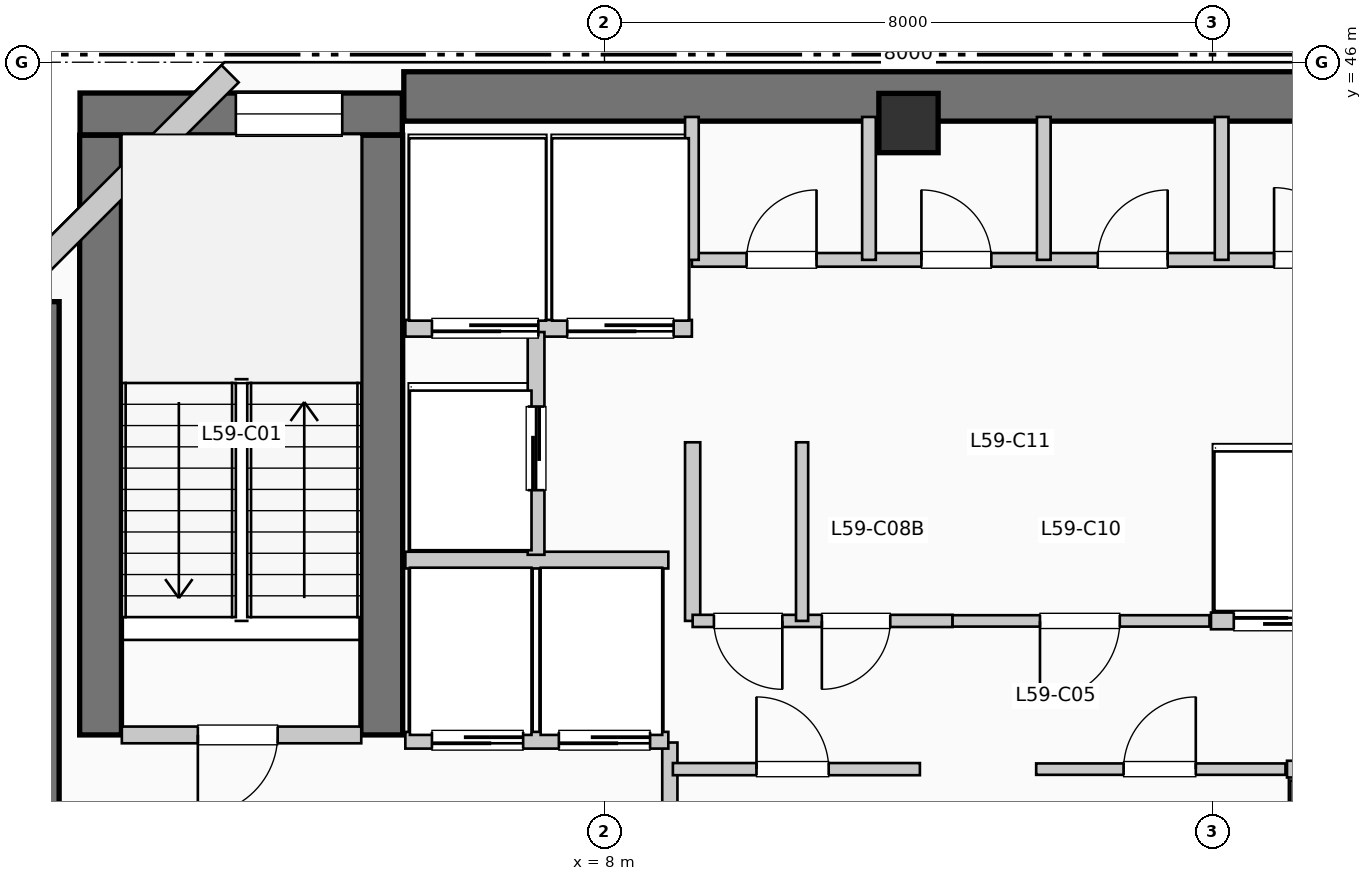
"""IFC4 building model, lengths in metres.
Left out: names, types, materials, properties, quantities, classifications, styles, units other than length and angle.
Written with IfcOpenShell. Run it as: python <this file> out.ifc"""

import sys

from ifc_helpers import new_model, si_unit, direction, frame, frame_2d, origin, origin_2d, place, context, subcontext, project, spatial, rectangle, extrude, element, fill, save


model = new_model("IFC4")
c1 = context("Model", 3, precision=1e-05, world=origin(), true_north=direction((0.0, 1.0)))
c2 = subcontext(c1, "Body", "Model", "MODEL_VIEW")
j1 = project(units=[si_unit("LENGTHUNIT", "METRE"), si_unit("PLANEANGLEUNIT", "RADIAN")], contexts=[c1])
p1 = place(None, origin())
s1 = spatial("IfcSite", under=j1, at=p1, CompositionType="ELEMENT")
p2 = place(p1, origin())
s2 = spatial("IfcBuilding", under=s1, at=p2, CompositionType="ELEMENT")
p3 = place(p2, frame((0.0, 0.0, 243.54)))
s3 = spatial("IfcBuildingStorey", under=s2, at=p3, CompositionType="ELEMENT", Elevation=243.54)
p4 = place(p3, frame((5.36, 45.55, 0.0), z_axis=(0.0, 0.0, 1.0), x_axis=(1.0, 0.0, 0.0)))
e1 = element("IfcWall", 1, at=p4, inside=s3, PredefinedType="SHEAR", context=c2, shape_type="SweptSolid", body=[
    extrude(rectangle(XDim=13.98, YDim=0.65, at=frame_2d((6.99, 0.0))), origin(), (0.0, 0.0, 1.0), 3.96),
])
p5 = place(p3, frame((0.5, 34.95, 0.0), z_axis=(0.0, 0.0, 1.0), x_axis=(0.0, 1.0, 0.0)))
e2 = element("IfcWall", 2, at=p5, inside=s3, PredefinedType="SHEAR", context=c2, shape_type="SweptSolid", body=[
    extrude(rectangle(XDim=7.9, YDim=0.65, at=frame_2d((3.95, 0.0))), origin(), (0.0, 0.0, 1.0), 3.96),
])
for number, where, z_axis, x_axis in (
    (3, (1.37, 37.15, 0.0), (0.0, 0.0, 1.0), (0.0, 1.0, 0.0)),
    (4, (5.07, 37.15, 0.0), (0.0, 0.0, 1.0), (0.0, 1.0, 0.0)),
):
    element("IfcWall", number, at=place(p3, frame(where, z_axis=z_axis, x_axis=x_axis)), inside=s3, PredefinedType="SHEAR", context=c2, shape_type="SweptSolid", body=[
        extrude(rectangle(XDim=7.89, YDim=0.55, at=frame_2d((3.945, 0.0))), origin(), (0.0, 0.0, 1.0), 3.96),
    ])
p6 = place(p3, frame((1.1, 45.32, 0.0), z_axis=(0.0, 0.0, 1.0), x_axis=(1.0, 0.0, 0.0)))
e5 = element("IfcWall", 5, at=p6, inside=s3, PredefinedType="SHEAR", context=c2, shape_type="SweptSolid", body=[
    extrude(rectangle(XDim=4.24, YDim=0.55, at=frame_2d((2.12, 0.0))), origin(), (0.0, 0.0, 1.0), 3.96),
])
p7 = place(p6, frame((2.05, 0.0, 1.05)))
e6 = element("IfcOpeningElement", 6, at=p7, cuts=e5, PredefinedType="OPENING", context=c2, shape_type="SweptSolid", body=[
    extrude(rectangle(XDim=1.4, YDim=1.8, at=frame_2d((0.7, 0.9))), frame((0.0, 0.285, 0.0), z_axis=(0.0, -1.0, 0.0), x_axis=(1.0, 0.0, 0.0)), (0.0, 0.0, 1.0), 0.57),
])
p8 = place(p3, frame((12.0, 45.2, 0.0), z_axis=(0.0, 0.0, 1.0), x_axis=(1.0, 0.0, 0.0)))
e7 = element("IfcColumn", 7, at=p8, inside=s3, PredefinedType="COLUMN", context=c2, shape_type="SweptSolid", body=[
    extrude(rectangle(XDim=0.78, YDim=0.78, at=origin_2d()), origin(), (0.0, 0.0, 1.0), 3.96),
])
p9 = place(p3, frame((3.074, 45.848, 0.0), z_axis=(0.0, 0.0, 1.0), x_axis=(-0.707106781187, -0.707106781187, 0.0)))
e8 = element("IfcWall", 8, at=p9, inside=s3, PredefinedType="SOLIDWALL", context=c2, shape_type="SweptSolid", body=[
    extrude(rectangle(XDim=4.133, YDim=0.32, at=frame_2d((2.066, 0.0))), origin(), (0.0, 0.0, 1.0), 3.71),
])
p10 = place(p3, frame((1.65, 37.15, 0.0), z_axis=(0.0, 0.0, 1.0), x_axis=(1.0, 0.0, 0.0)))
e9 = element("IfcWall", 9, at=p10, inside=s3, PredefinedType="PARTITIONING", context=c2, shape_type="SweptSolid", body=[
    extrude(rectangle(XDim=3.15, YDim=0.22, at=frame_2d((1.575, 0.0))), origin(), (0.0, 0.0, 1.0), 3.71),
])
p11 = place(p10, frame((2.05, 0.0, 0.0), z_axis=(0.0, 0.0, 1.0), x_axis=(-1.0, 0.0, 0.0)))
e10 = element("IfcOpeningElement", 10, at=p11, cuts=e9, PredefinedType="OPENING", context=c2, shape_type="SweptSolid", body=[
    extrude(rectangle(XDim=1.05, YDim=2.15, at=frame_2d((0.525, 1.075))), frame((0.0, 0.12, 0.0), z_axis=(0.0, -1.0, 0.0), x_axis=(1.0, 0.0, 0.0)), (0.0, 0.0, 1.0), 0.24),
])
p12 = place(p3, frame((8.86, 34.55, 0.0), z_axis=(0.0, 0.0, 1.0), x_axis=(0.0, 1.0, 0.0)))
e11 = element("IfcWall", 11, at=p12, inside=s3, PredefinedType="PARTITIONING", context=c2, shape_type="SweptSolid", body=[
    extrude(rectangle(XDim=2.5, YDim=0.2, at=frame_2d((1.25, 0.0))), origin(), (0.0, 0.0, 1.0), 3.71),
])
p13 = place(p3, frame((5.38, 37.08, 0.0), z_axis=(0.0, 0.0, 1.0), x_axis=(1.0, 0.0, 0.0)))
e12 = element("IfcWall", 12, at=p13, inside=s3, PredefinedType="PARTITIONING", context=c2, shape_type="SweptSolid", body=[
    extrude(rectangle(XDim=3.46, YDim=0.22, at=frame_2d((1.73, 0.0))), origin(), (0.0, 0.0, 1.0), 3.71),
])
p14 = place(p13, frame((1.55, 0.0, 0.0), z_axis=(0.0, 0.0, 1.0), x_axis=(-1.0, 0.0, 0.0)))
e13 = element("IfcOpeningElement", 13, at=p14, cuts=e12, PredefinedType="OPENING", context=c2, shape_type="SweptSolid", body=[
    extrude(rectangle(XDim=1.2, YDim=2.2, at=frame_2d((0.6, 1.1))), frame((0.0, 0.12, 0.0), z_axis=(0.0, -1.0, 0.0), x_axis=(1.0, 0.0, 0.0)), (0.0, 0.0, 1.0), 0.24),
])
p15 = place(p13, frame((3.22, 0.0, 0.0), z_axis=(0.0, 0.0, 1.0), x_axis=(-1.0, 0.0, 0.0)))
e14 = element("IfcOpeningElement", 14, at=p15, cuts=e12, PredefinedType="OPENING", context=c2, shape_type="SweptSolid", body=[
    extrude(rectangle(XDim=1.2, YDim=2.2, at=frame_2d((0.6, 1.1))), frame((0.0, 0.12, 0.0), z_axis=(0.0, -1.0, 0.0), x_axis=(1.0, 0.0, 0.0)), (0.0, 0.0, 1.0), 0.24),
])
p16 = place(p3, frame((5.38, 39.45, 0.0), z_axis=(0.0, 0.0, 1.0), x_axis=(1.0, 0.0, 0.0)))
e15 = element("IfcWall", 15, at=p16, inside=s3, PredefinedType="PARTITIONING", context=c2, shape_type="SweptSolid", body=[
    extrude(rectangle(XDim=3.46, YDim=0.22, at=frame_2d((1.73, 0.0))), origin(), (0.0, 0.0, 1.0), 3.71),
])
p17 = place(p3, frame((5.38, 42.5, 0.0), z_axis=(0.0, 0.0, 1.0), x_axis=(1.0, 0.0, 0.0)))
e16 = element("IfcWall", 16, at=p17, inside=s3, PredefinedType="PARTITIONING", context=c2, shape_type="SweptSolid", body=[
    extrude(rectangle(XDim=3.77, YDim=0.22, at=frame_2d((1.885, 0.0))), origin(), (0.0, 0.0, 1.0), 3.71),
])
p18 = place(p17, frame((1.75, 0.0, 0.0), z_axis=(0.0, 0.0, 1.0), x_axis=(-1.0, 0.0, 0.0)))
e17 = element("IfcOpeningElement", 17, at=p18, cuts=e16, PredefinedType="OPENING", context=c2, shape_type="SweptSolid", body=[
    extrude(rectangle(XDim=1.4, YDim=2.2, at=frame_2d((0.7, 1.1))), frame((0.0, 0.12, 0.0), z_axis=(0.0, -1.0, 0.0), x_axis=(1.0, 0.0, 0.0)), (0.0, 0.0, 1.0), 0.24),
])
p19 = place(p17, frame((3.53, 0.0, 0.0), z_axis=(0.0, 0.0, 1.0), x_axis=(-1.0, 0.0, 0.0)))
e18 = element("IfcOpeningElement", 18, at=p19, cuts=e16, PredefinedType="OPENING", context=c2, shape_type="SweptSolid", body=[
    extrude(rectangle(XDim=1.4, YDim=2.2, at=frame_2d((0.7, 1.1))), frame((0.0, 0.12, 0.0), z_axis=(0.0, -1.0, 0.0), x_axis=(1.0, 0.0, 0.0)), (0.0, 0.0, 1.0), 0.24),
])
p20 = place(p3, frame((7.1, 39.52, 0.0), z_axis=(0.0, 0.0, 1.0), x_axis=(0.0, 1.0, 0.0)))
e19 = element("IfcWall", 19, at=p20, inside=s3, PredefinedType="PARTITIONING", context=c2, shape_type="SweptSolid", body=[
    extrude(rectangle(XDim=2.93, YDim=0.22, at=frame_2d((1.465, 0.0))), origin(), (0.0, 0.0, 1.0), 3.71),
])
p21 = place(p20, frame((0.85, 0.0, 0.0)))
e20 = element("IfcOpeningElement", 20, at=p21, cuts=e19, PredefinedType="OPENING", context=c2, shape_type="SweptSolid", body=[
    extrude(rectangle(XDim=1.1, YDim=2.2, at=frame_2d((0.55, 1.1))), frame((0.0, 0.12, 0.0), z_axis=(0.0, -1.0, 0.0), x_axis=(1.0, 0.0, 0.0)), (0.0, 0.0, 1.0), 0.24),
])
p22 = place(p3, frame((9.16, 38.65, 0.0), z_axis=(0.0, 0.0, 1.0), x_axis=(0.0, 1.0, 0.0)))
e21 = element("IfcWall", 21, at=p22, inside=s3, PredefinedType="PARTITIONING", context=c2, shape_type="SweptSolid", body=[
    extrude(rectangle(XDim=2.35, YDim=0.2, at=frame_2d((1.175, 0.0))), origin(), (0.0, 0.0, 1.0), 3.71),
])
p23 = place(p3, frame((8.9, 36.7, 0.0), z_axis=(0.0, 0.0, 1.0), x_axis=(1.0, 0.0, 0.0)))
e22 = element("IfcWall", 22, at=p23, inside=s3, PredefinedType="PARTITIONING", context=c2, shape_type="SweptSolid", body=[
    extrude(rectangle(XDim=3.25, YDim=0.16, at=frame_2d((1.625, 0.0))), origin(), (0.0, 0.0, 1.0), 3.71),
])
p24 = place(p23, frame((1.1, 0.0, 0.0)))
e23 = element("IfcOpeningElement", 23, at=p24, cuts=e22, PredefinedType="OPENING", context=c2, shape_type="SweptSolid", body=[
    extrude(rectangle(XDim=0.95, YDim=2.15, at=frame_2d((0.475, 1.075))), frame((0.0, 0.09, 0.0), z_axis=(0.0, -1.0, 0.0), x_axis=(1.0, 0.0, 0.0)), (0.0, 0.0, 1.0), 0.18),
])
p25 = place(p3, frame((9.16, 38.65, 0.0), z_axis=(0.0, 0.0, 1.0), x_axis=(1.0, 0.0, 0.0)))
e24 = element("IfcWall", 24, at=p25, inside=s3, PredefinedType="PARTITIONING", context=c2, shape_type="SweptSolid", body=[
    extrude(rectangle(XDim=3.42, YDim=0.16, at=frame_2d((1.71, 0.0))), origin(), (0.0, 0.0, 1.0), 3.71),
])
p26 = place(p25, frame((1.18, 0.0, 0.0), z_axis=(0.0, 0.0, 1.0), x_axis=(-1.0, 0.0, 0.0)))
e25 = element("IfcOpeningElement", 25, at=p26, cuts=e24, PredefinedType="OPENING", context=c2, shape_type="SweptSolid", body=[
    extrude(rectangle(XDim=0.9, YDim=2.15, at=frame_2d((0.45, 1.075))), frame((0.0, 0.09, 0.0), z_axis=(0.0, -1.0, 0.0), x_axis=(1.0, 0.0, 0.0)), (0.0, 0.0, 1.0), 0.18),
])
p27 = place(p25, frame((2.6, 0.0, 0.0), z_axis=(0.0, 0.0, 1.0), x_axis=(-1.0, 0.0, 0.0)))
e26 = element("IfcOpeningElement", 26, at=p27, cuts=e24, PredefinedType="OPENING", context=c2, shape_type="SweptSolid", body=[
    extrude(rectangle(XDim=0.9, YDim=2.15, at=frame_2d((0.45, 1.075))), frame((0.0, 0.09, 0.0), z_axis=(0.0, -1.0, 0.0), x_axis=(1.0, 0.0, 0.0)), (0.0, 0.0, 1.0), 0.18),
])
p28 = place(p3, frame((10.6, 38.65, 0.0), z_axis=(0.0, 0.0, 1.0), x_axis=(0.0, 1.0, 0.0)))
e27 = element("IfcWall", 27, at=p28, inside=s3, PredefinedType="PARTITIONING", context=c2, shape_type="SweptSolid", body=[
    extrude(rectangle(XDim=2.35, YDim=0.16, at=frame_2d((1.175, 0.0))), origin(), (0.0, 0.0, 1.0), 3.71),
])
p29 = place(p3, frame((13.68, 36.7, 0.0), z_axis=(0.0, 0.0, 1.0), x_axis=(1.0, 0.0, 0.0)))
e28 = element("IfcWall", 28, at=p29, inside=s3, PredefinedType="PARTITIONING", context=c2, shape_type="SweptSolid", body=[
    extrude(rectangle(XDim=3.28, YDim=0.15, at=frame_2d((1.64, 0.0))), origin(), (0.0, 0.0, 1.0), 3.71),
])
p30 = place(p29, frame((1.15, 0.0, 0.0)))
e29 = element("IfcOpeningElement", 29, at=p30, cuts=e28, PredefinedType="OPENING", context=c2, shape_type="SweptSolid", body=[
    extrude(rectangle(XDim=0.95, YDim=2.15, at=frame_2d((0.475, 1.075))), frame((0.0, 0.085, 0.0), z_axis=(0.0, -1.0, 0.0), x_axis=(1.0, 0.0, 0.0)), (0.0, 0.0, 1.0), 0.17),
])
p31 = place(p3, frame((12.58, 38.65, 0.0), z_axis=(0.0, 0.0, 1.0), x_axis=(1.0, 0.0, 0.0)))
e30 = element("IfcWall", 30, at=p31, inside=s3, PredefinedType="PARTITIONING", context=c2, shape_type="SweptSolid", body=[
    extrude(rectangle(XDim=3.38, YDim=0.15, at=frame_2d((1.69, 0.0))), origin(), (0.0, 0.0, 1.0), 3.71),
])
p32 = place(p31, frame((2.2, 0.0, 0.0), z_axis=(0.0, 0.0, 1.0), x_axis=(-1.0, 0.0, 0.0)))
e31 = element("IfcOpeningElement", 31, at=p32, cuts=e30, PredefinedType="OPENING", context=c2, shape_type="SweptSolid", body=[
    extrude(rectangle(XDim=1.05, YDim=2.15, at=frame_2d((0.525, 1.075))), frame((0.0, 0.085, 0.0), z_axis=(0.0, -1.0, 0.0), x_axis=(1.0, 0.0, 0.0)), (0.0, 0.0, 1.0), 0.17),
])
p33 = place(p3, frame((16.98, 36.7, 0.0), z_axis=(0.0, 0.0, 1.0), x_axis=(1.0, 0.0, 0.0)))
e32 = element("IfcWall", 32, at=p33, inside=s3, PredefinedType="PARTITIONING", context=c2, shape_type="SweptSolid", body=[
    extrude(rectangle(XDim=1.7, YDim=0.22, at=frame_2d((0.85, 0.0))), origin(), (0.0, 0.0, 1.0), 3.71),
])
p34 = place(p33, frame((0.3, 0.0, 0.0)))
e33 = element("IfcOpeningElement", 33, at=p34, cuts=e32, PredefinedType="OPENING", context=c2, shape_type="SweptSolid", body=[
    extrude(rectangle(XDim=1.1, YDim=2.2, at=frame_2d((0.55, 1.1))), frame((0.0, 0.12, 0.0), z_axis=(0.0, -1.0, 0.0), x_axis=(1.0, 0.0, 0.0)), (0.0, 0.0, 1.0), 0.24),
])
p35 = place(p3, frame((15.98, 38.65, 0.0), z_axis=(0.0, 0.0, 1.0), x_axis=(1.0, 0.0, 0.0)))
e34 = element("IfcWall", 34, at=p35, inside=s3, PredefinedType="PARTITIONING", context=c2, shape_type="SweptSolid", body=[
    extrude(rectangle(XDim=1.72, YDim=0.22, at=frame_2d((0.86, 0.0))), origin(), (0.0, 0.0, 1.0), 3.71),
])
p36 = place(p35, frame((0.3, 0.0, 0.0)))
e35 = element("IfcOpeningElement", 35, at=p36, cuts=e34, PredefinedType="OPENING", context=c2, shape_type="SweptSolid", body=[
    extrude(rectangle(XDim=1.1, YDim=2.2, at=frame_2d((0.55, 1.1))), frame((0.0, 0.12, 0.0), z_axis=(0.0, -1.0, 0.0), x_axis=(1.0, 0.0, 0.0)), (0.0, 0.0, 1.0), 0.24),
])
p37 = place(p3, frame((9.15, 43.4, 0.0), z_axis=(0.0, 0.0, 1.0), x_axis=(1.0, 0.0, 0.0)))
e36 = element("IfcWall", 36, at=p37, inside=s3, PredefinedType="PLUMBINGWALL", context=c2, shape_type="SweptSolid", body=[
    extrude(rectangle(XDim=9.33, YDim=0.18, at=frame_2d((4.665, 0.0))), origin(), (0.0, 0.0, 1.0), 3.71),
])
p38 = place(p37, frame((0.72, 0.0, 0.0)))
e37 = element("IfcOpeningElement", 37, at=p38, cuts=e36, PredefinedType="OPENING", context=c2, shape_type="SweptSolid", body=[
    extrude(rectangle(XDim=0.92, YDim=2.1, at=frame_2d((0.46, 1.05))), frame((0.0, 0.1, 0.0), z_axis=(0.0, -1.0, 0.0), x_axis=(1.0, 0.0, 0.0)), (0.0, 0.0, 1.0), 0.2),
])
p39 = place(p37, frame((3.02, 0.0, 0.0)))
e38 = element("IfcOpeningElement", 38, at=p39, cuts=e36, PredefinedType="OPENING", context=c2, shape_type="SweptSolid", body=[
    extrude(rectangle(XDim=0.92, YDim=2.1, at=frame_2d((0.46, 1.05))), frame((0.0, 0.1, 0.0), z_axis=(0.0, -1.0, 0.0), x_axis=(1.0, 0.0, 0.0)), (0.0, 0.0, 1.0), 0.2),
])
p40 = place(p37, frame((5.34, 0.0, 0.0)))
e39 = element("IfcOpeningElement", 39, at=p40, cuts=e36, PredefinedType="OPENING", context=c2, shape_type="SweptSolid", body=[
    extrude(rectangle(XDim=0.92, YDim=2.1, at=frame_2d((0.46, 1.05))), frame((0.0, 0.1, 0.0), z_axis=(0.0, -1.0, 0.0), x_axis=(1.0, 0.0, 0.0)), (0.0, 0.0, 1.0), 0.2),
])
p41 = place(p37, frame((7.66, 0.0, 0.0)))
e40 = element("IfcOpeningElement", 40, at=p41, cuts=e36, PredefinedType="OPENING", context=c2, shape_type="SweptSolid", body=[
    extrude(rectangle(XDim=0.95, YDim=2.1, at=frame_2d((0.475, 1.05))), frame((0.0, 0.1, 0.0), z_axis=(0.0, -1.0, 0.0), x_axis=(1.0, 0.0, 0.0)), (0.0, 0.0, 1.0), 0.2),
])
for number, where, z_axis, x_axis in (
    (41, (9.15, 43.4, 0.0), (0.0, 0.0, 1.0), (0.0, 1.0, 0.0)),
    (42, (11.48, 43.4, 0.0), (0.0, 0.0, 1.0), (0.0, 1.0, 0.0)),
    (43, (13.78, 43.4, 0.0), (0.0, 0.0, 1.0), (0.0, 1.0, 0.0)),
    (44, (16.12, 43.4, 0.0), (0.0, 0.0, 1.0), (0.0, 1.0, 0.0)),
):
    element("IfcWall", number, at=place(p3, frame(where, z_axis=z_axis, x_axis=x_axis)), inside=s3, PredefinedType="PLUMBINGWALL", context=c2, shape_type="SweptSolid", body=[
        extrude(rectangle(XDim=1.88, YDim=0.18, at=frame_2d((0.94, 0.0))), origin(), (0.0, 0.0, 1.0), 3.71),
    ])
p42 = place(p7, origin())
e45 = element("IfcWindow", 45, at=p42, inside=s3, PartitioningType="SINGLE_PANEL", PredefinedType="WINDOW", context=c2, shape_type="SweptSolid", body=[
    extrude(rectangle(XDim=1.4, YDim=1.8, at=frame_2d((0.7, 0.9))), frame((0.0, 0.03, 0.0), z_axis=(0.0, -1.0, 0.0), x_axis=(1.0, 0.0, 0.0)), (0.0, 0.0, 1.0), 0.06),
])
fill(e6, e45)
p43 = place(p11, origin())
e46 = element("IfcDoor", 46, at=p43, inside=s3, OperationType="SINGLE_SWING_LEFT", PredefinedType="DOOR", context=c2, shape_type="SweptSolid", body=[
    extrude(rectangle(XDim=1.05, YDim=2.15, at=frame_2d((0.525, 1.075))), frame((0.0, 0.025, 0.0), z_axis=(0.0, -1.0, 0.0), x_axis=(1.0, 0.0, 0.0)), (0.0, 0.0, 1.0), 0.05),
])
fill(e10, e46)
p44 = place(p14, origin())
e47 = element("IfcDoor", 47, at=p44, inside=s3, OperationType="SLIDING_TO_RIGHT", PredefinedType="DOOR", context=c2, shape_type="SweptSolid", body=[
    extrude(rectangle(XDim=1.2, YDim=2.2, at=frame_2d((0.6, 1.1))), frame((0.0, 0.025, 0.0), z_axis=(0.0, -1.0, 0.0), x_axis=(1.0, 0.0, 0.0)), (0.0, 0.0, 1.0), 0.05),
])
fill(e13, e47)
p45 = place(p15, origin())
e48 = element("IfcDoor", 48, at=p45, inside=s3, OperationType="SLIDING_TO_RIGHT", PredefinedType="DOOR", context=c2, shape_type="SweptSolid", body=[
    extrude(rectangle(XDim=1.2, YDim=2.2, at=frame_2d((0.6, 1.1))), frame((0.0, 0.025, 0.0), z_axis=(0.0, -1.0, 0.0), x_axis=(1.0, 0.0, 0.0)), (0.0, 0.0, 1.0), 0.05),
])
fill(e14, e48)
p46 = place(p18, origin())
e49 = element("IfcDoor", 49, at=p46, inside=s3, OperationType="SLIDING_TO_LEFT", PredefinedType="DOOR", context=c2, shape_type="SweptSolid", body=[
    extrude(rectangle(XDim=1.4, YDim=2.2, at=frame_2d((0.7, 1.1))), frame((0.0, 0.025, 0.0), z_axis=(0.0, -1.0, 0.0), x_axis=(1.0, 0.0, 0.0)), (0.0, 0.0, 1.0), 0.05),
])
fill(e17, e49)
p47 = place(p19, origin())
e50 = element("IfcDoor", 50, at=p47, inside=s3, OperationType="SLIDING_TO_LEFT", PredefinedType="DOOR", context=c2, shape_type="SweptSolid", body=[
    extrude(rectangle(XDim=1.4, YDim=2.2, at=frame_2d((0.7, 1.1))), frame((0.0, 0.025, 0.0), z_axis=(0.0, -1.0, 0.0), x_axis=(1.0, 0.0, 0.0)), (0.0, 0.0, 1.0), 0.05),
])
fill(e18, e50)
p48 = place(p21, origin())
e51 = element("IfcDoor", 51, at=p48, inside=s3, OperationType="SLIDING_TO_LEFT", PredefinedType="DOOR", context=c2, shape_type="SweptSolid", body=[
    extrude(rectangle(XDim=1.1, YDim=2.2, at=frame_2d((0.55, 1.1))), frame((0.0, 0.025, 0.0), z_axis=(0.0, -1.0, 0.0), x_axis=(1.0, 0.0, 0.0)), (0.0, 0.0, 1.0), 0.05),
])
fill(e20, e51)
p49 = place(p24, origin())
e52 = element("IfcDoor", 52, at=p49, inside=s3, OperationType="SINGLE_SWING_LEFT", PredefinedType="DOOR", context=c2, shape_type="SweptSolid", body=[
    extrude(rectangle(XDim=0.95, YDim=2.15, at=frame_2d((0.475, 1.075))), frame((0.0, 0.025, 0.0), z_axis=(0.0, -1.0, 0.0), x_axis=(1.0, 0.0, 0.0)), (0.0, 0.0, 1.0), 0.05),
])
fill(e23, e52)
p50 = place(p26, origin())
e53 = element("IfcDoor", 53, at=p50, inside=s3, OperationType="SINGLE_SWING_RIGHT", PredefinedType="DOOR", context=c2, shape_type="SweptSolid", body=[
    extrude(rectangle(XDim=0.9, YDim=2.15, at=frame_2d((0.45, 1.075))), frame((0.0, 0.025, 0.0), z_axis=(0.0, -1.0, 0.0), x_axis=(1.0, 0.0, 0.0)), (0.0, 0.0, 1.0), 0.05),
])
fill(e25, e53)
p51 = place(p27, origin())
e54 = element("IfcDoor", 54, at=p51, inside=s3, OperationType="SINGLE_SWING_LEFT", PredefinedType="DOOR", context=c2, shape_type="SweptSolid", body=[
    extrude(rectangle(XDim=0.9, YDim=2.15, at=frame_2d((0.45, 1.075))), frame((0.0, 0.025, 0.0), z_axis=(0.0, -1.0, 0.0), x_axis=(1.0, 0.0, 0.0)), (0.0, 0.0, 1.0), 0.05),
])
fill(e26, e54)
p52 = place(p30, origin())
e55 = element("IfcDoor", 55, at=p52, inside=s3, OperationType="SINGLE_SWING_RIGHT", PredefinedType="DOOR", context=c2, shape_type="SweptSolid", body=[
    extrude(rectangle(XDim=0.95, YDim=2.15, at=frame_2d((0.475, 1.075))), frame((0.0, 0.025, 0.0), z_axis=(0.0, -1.0, 0.0), x_axis=(1.0, 0.0, 0.0)), (0.0, 0.0, 1.0), 0.05),
])
fill(e29, e55)
p53 = place(p32, origin())
e56 = element("IfcDoor", 56, at=p53, inside=s3, OperationType="SINGLE_SWING_LEFT", PredefinedType="DOOR", context=c2, shape_type="SweptSolid", body=[
    extrude(rectangle(XDim=1.05, YDim=2.15, at=frame_2d((0.525, 1.075))), frame((0.0, 0.025, 0.0), z_axis=(0.0, -1.0, 0.0), x_axis=(1.0, 0.0, 0.0)), (0.0, 0.0, 1.0), 0.05),
])
fill(e31, e56)
p54 = place(p36, origin())
e57 = element("IfcDoor", 57, at=p54, inside=s3, OperationType="SLIDING_TO_LEFT", PredefinedType="DOOR", context=c2, shape_type="SweptSolid", body=[
    extrude(rectangle(XDim=1.1, YDim=2.2, at=frame_2d((0.55, 1.1))), frame((0.0, 0.025, 0.0), z_axis=(0.0, -1.0, 0.0), x_axis=(1.0, 0.0, 0.0)), (0.0, 0.0, 1.0), 0.05),
])
fill(e35, e57)
p55 = place(p38, origin())
e58 = element("IfcDoor", 58, at=p55, inside=s3, OperationType="SINGLE_SWING_RIGHT", PredefinedType="DOOR", context=c2, shape_type="SweptSolid", body=[
    extrude(rectangle(XDim=0.92, YDim=2.1, at=frame_2d((0.46, 1.05))), frame((0.0, 0.025, 0.0), z_axis=(0.0, -1.0, 0.0), x_axis=(1.0, 0.0, 0.0)), (0.0, 0.0, 1.0), 0.05),
])
fill(e37, e58)
p56 = place(p39, origin())
e59 = element("IfcDoor", 59, at=p56, inside=s3, OperationType="SINGLE_SWING_LEFT", PredefinedType="DOOR", context=c2, shape_type="SweptSolid", body=[
    extrude(rectangle(XDim=0.92, YDim=2.1, at=frame_2d((0.46, 1.05))), frame((0.0, 0.025, 0.0), z_axis=(0.0, -1.0, 0.0), x_axis=(1.0, 0.0, 0.0)), (0.0, 0.0, 1.0), 0.05),
])
fill(e38, e59)
p57 = place(p40, origin())
e60 = element("IfcDoor", 60, at=p57, inside=s3, OperationType="SINGLE_SWING_RIGHT", PredefinedType="DOOR", context=c2, shape_type="SweptSolid", body=[
    extrude(rectangle(XDim=0.92, YDim=2.1, at=frame_2d((0.46, 1.05))), frame((0.0, 0.025, 0.0), z_axis=(0.0, -1.0, 0.0), x_axis=(1.0, 0.0, 0.0)), (0.0, 0.0, 1.0), 0.05),
])
fill(e39, e60)
p58 = place(p41, origin())
e61 = element("IfcDoor", 61, at=p58, inside=s3, OperationType="SINGLE_SWING_LEFT", PredefinedType="DOOR", context=c2, shape_type="SweptSolid", body=[
    extrude(rectangle(XDim=0.95, YDim=2.1, at=frame_2d((0.475, 1.05))), frame((0.0, 0.025, 0.0), z_axis=(0.0, -1.0, 0.0), x_axis=(1.0, 0.0, 0.0)), (0.0, 0.0, 1.0), 0.05),
])
fill(e40, e61)
save(model, sys.argv[1])
